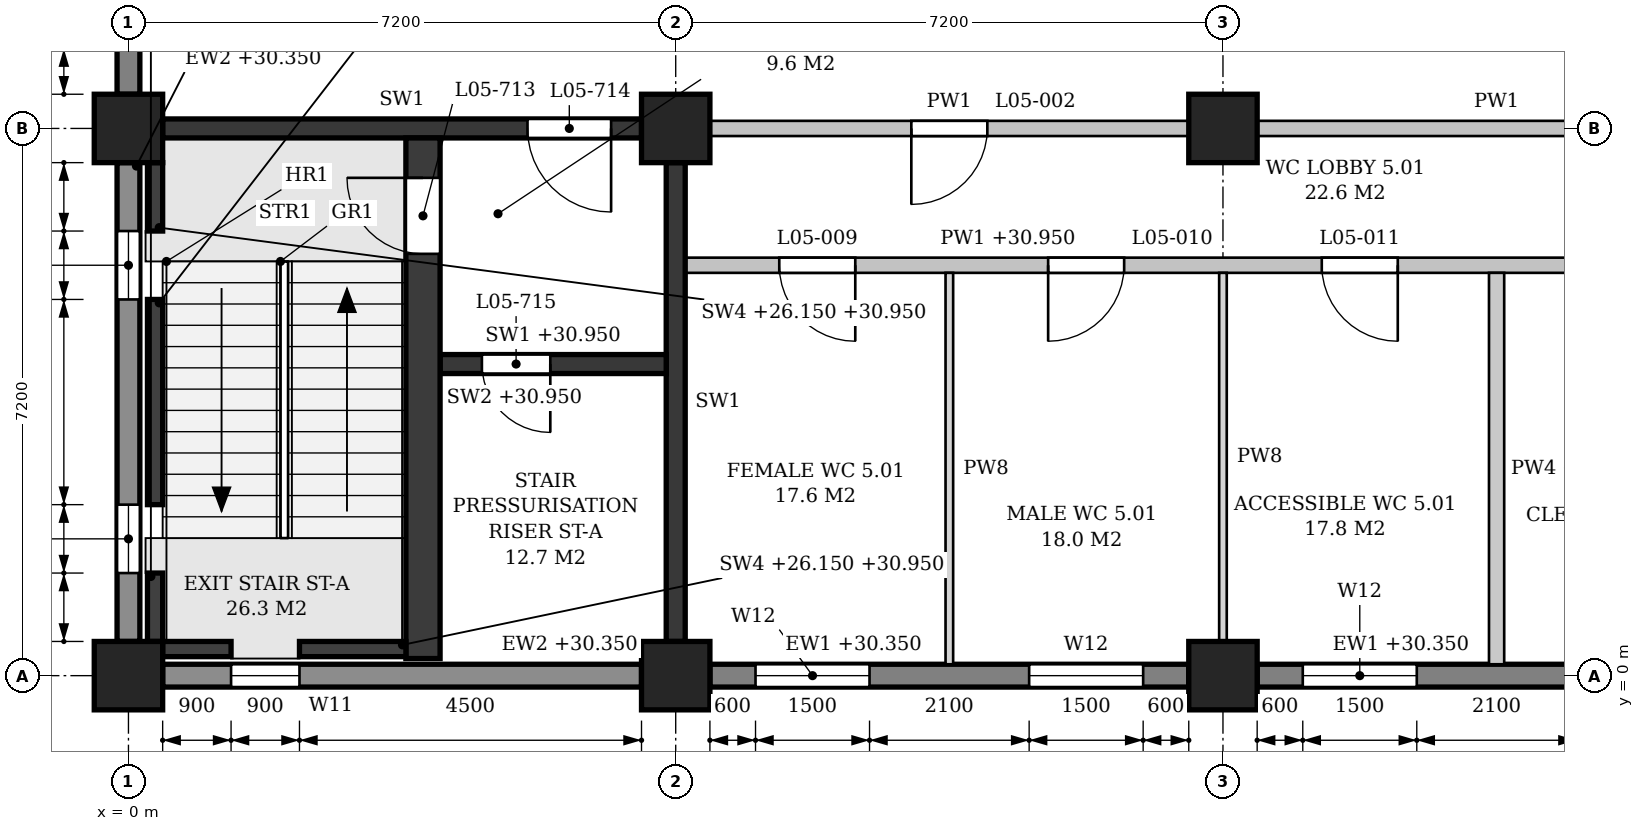
"""IFC4 building model, lengths in metres.
Left out: names, types, materials, properties, quantities, classifications, styles, units other than length and angle.
Written with IfcOpenShell. Run it as: python <this file> out.ifc"""

import sys

from ifc_helpers import new_model, si_unit, direction, frame, frame_2d, origin, origin_2d, place, context, subcontext, project, spatial, polyline, rectangle, outline, extrude, element, fill, save


model = new_model("IFC4")
c1 = context("Model", 3, precision=1e-05, world=origin(), true_north=direction((0.0, 1.0)))
c2 = subcontext(c1, "Body", "Model", "MODEL_VIEW")
j1 = project(units=[si_unit("LENGTHUNIT", "METRE"), si_unit("PLANEANGLEUNIT", "RADIAN")], contexts=[c1])
p1 = place(None, origin())
s1 = spatial("IfcSite", under=j1, at=p1, CompositionType="ELEMENT")
p2 = place(p1, origin())
s2 = spatial("IfcBuilding", under=s1, at=p2, CompositionType="ELEMENT")
p3 = place(p2, frame((0.0, 0.0, 26.4)))
s3 = spatial("IfcBuildingStorey", under=s2, at=p3, CompositionType="ELEMENT", Elevation=26.4)
for number, where, z_axis, x_axis in (
    (1, (0.0, 0.0, 0.0), (0.0, 0.0, 1.0), (1.0, 0.0, 0.0)),
    (2, (0.0, 7.2, 0.0), (0.0, 0.0, 1.0), (1.0, 0.0, 0.0)),
    (3, (7.2, 0.0, 0.0), (0.0, 0.0, 1.0), (1.0, 0.0, 0.0)),
    (4, (7.2, 7.2, 0.0), (0.0, 0.0, 1.0), (1.0, 0.0, 0.0)),
    (5, (14.4, 0.0, 0.0), (0.0, 0.0, 1.0), (1.0, 0.0, 0.0)),
    (6, (14.4, 7.2, 0.0), (0.0, 0.0, 1.0), (1.0, 0.0, 0.0)),
):
    element("IfcColumn", number, at=place(p3, frame(where, z_axis=z_axis, x_axis=x_axis)), inside=s3, PredefinedType="COLUMN", context=c2, shape_type="SweptSolid", body=[
        extrude(rectangle(XDim=0.9, YDim=0.9, at=origin_2d()), origin(), (0.0, 0.0, 1.0), 4.8),
    ])
p4 = place(p3, frame((0.0, 0.45, 0.0), z_axis=(0.0, 0.0, 1.0), x_axis=(0.0, 1.0, 0.0)))
e7 = element("IfcWall", 7, at=p4, inside=s3, PredefinedType="STANDARD", context=c2, shape_type="SweptSolid", body=[
    extrude(rectangle(XDim=6.3, YDim=0.3, at=frame_2d((3.15, 0.0))), origin(), (0.0, 0.0, 1.0), 3.95),
])
p5 = place(p4, frame((0.9, 0.0, 0.9)))
e8 = element("IfcOpeningElement", 8, at=p5, cuts=e7, PredefinedType="OPENING", context=c2, shape_type="SweptSolid", body=[
    extrude(outline(polyline([(0.0, 0.0), (0.9, 0.0), (0.9, 2.05), (0.45, 2.5), (0.0, 2.05), (0.0, 0.0)])), frame((0.0, 0.16, 0.0), z_axis=(0.0, -1.0, 0.0), x_axis=(1.0, 0.0, 0.0)), (0.0, 0.0, 1.0), 0.32),
])
p6 = place(p4, frame((4.5, 0.0, 0.9)))
e9 = element("IfcOpeningElement", 9, at=p6, cuts=e7, PredefinedType="OPENING", context=c2, shape_type="SweptSolid", body=[
    extrude(outline(polyline([(0.0, 0.0), (0.9, 0.0), (0.9, 2.05), (0.45, 2.5), (0.0, 2.05), (0.0, 0.0)])), frame((0.0, 0.16, 0.0), z_axis=(0.0, -1.0, 0.0), x_axis=(1.0, 0.0, 0.0)), (0.0, 0.0, 1.0), 0.32),
])
p7 = place(p3, frame((0.0, 7.65, 0.0), z_axis=(0.0, 0.0, 1.0), x_axis=(0.0, 1.0, 0.0)))
e10 = element("IfcWall", 10, at=p7, inside=s3, PredefinedType="STANDARD", context=c2, shape_type="SweptSolid", body=[
    extrude(rectangle(XDim=6.3, YDim=0.3, at=frame_2d((3.15, 0.0))), origin(), (0.0, 0.0, 1.0), 3.95),
])
p8 = place(p7, frame((0.6, 0.0, 0.9)))
e11 = element("IfcOpeningElement", 11, at=p8, cuts=e10, PredefinedType="OPENING", context=c2, shape_type="SweptSolid", body=[
    extrude(outline(polyline([(0.0, 0.0), (1.5, 0.0), (1.5, 1.75), (0.75, 2.5), (0.0, 1.75), (0.0, 0.0)])), frame((0.0, 0.16, 0.0), z_axis=(0.0, -1.0, 0.0), x_axis=(1.0, 0.0, 0.0)), (0.0, 0.0, 1.0), 0.32),
])
p9 = place(p7, frame((4.2, 0.0, 0.9)))
e12 = element("IfcOpeningElement", 12, at=p9, cuts=e10, PredefinedType="OPENING", context=c2, shape_type="SweptSolid", body=[
    extrude(outline(polyline([(0.0, 0.0), (1.5, 0.0), (1.5, 1.75), (0.75, 2.5), (0.0, 1.75), (0.0, 0.0)])), frame((0.0, 0.16, 0.0), z_axis=(0.0, -1.0, 0.0), x_axis=(1.0, 0.0, 0.0)), (0.0, 0.0, 1.0), 0.32),
])
p10 = place(p3, frame((0.45, 0.0, 0.0), z_axis=(0.0, 0.0, 1.0), x_axis=(1.0, 0.0, 0.0)))
e13 = element("IfcWall", 13, at=p10, inside=s3, PredefinedType="STANDARD", context=c2, shape_type="SweptSolid", body=[
    extrude(rectangle(XDim=6.3, YDim=0.3, at=frame_2d((3.15, 0.0))), origin(), (0.0, 0.0, 1.0), 3.95),
])
p11 = place(p10, frame((0.9, 0.0, 0.9)))
e14 = element("IfcOpeningElement", 14, at=p11, cuts=e13, PredefinedType="OPENING", context=c2, shape_type="SweptSolid", body=[
    extrude(outline(polyline([(0.0, 0.0), (0.9, 0.0), (0.9, 2.05), (0.45, 2.5), (0.0, 2.05), (0.0, 0.0)])), frame((0.0, 0.16, 0.0), z_axis=(0.0, -1.0, 0.0), x_axis=(1.0, 0.0, 0.0)), (0.0, 0.0, 1.0), 0.32),
])
p12 = place(p3, frame((7.65, 0.0, 0.0), z_axis=(0.0, 0.0, 1.0), x_axis=(1.0, 0.0, 0.0)))
e15 = element("IfcWall", 15, at=p12, inside=s3, PredefinedType="STANDARD", context=c2, shape_type="SweptSolid", body=[
    extrude(rectangle(XDim=6.3, YDim=0.3, at=frame_2d((3.15, 0.0))), origin(), (0.0, 0.0, 1.0), 3.95),
])
p13 = place(p12, frame((0.6, 0.0, 0.9)))
e16 = element("IfcOpeningElement", 16, at=p13, cuts=e15, PredefinedType="OPENING", context=c2, shape_type="SweptSolid", body=[
    extrude(outline(polyline([(0.0, 0.0), (1.5, 0.0), (1.5, 1.75), (0.75, 2.5), (0.0, 1.75), (0.0, 0.0)])), frame((0.0, 0.16, 0.0), z_axis=(0.0, -1.0, 0.0), x_axis=(1.0, 0.0, 0.0)), (0.0, 0.0, 1.0), 0.32),
])
p14 = place(p12, frame((4.2, 0.0, 0.9)))
e17 = element("IfcOpeningElement", 17, at=p14, cuts=e15, PredefinedType="OPENING", context=c2, shape_type="SweptSolid", body=[
    extrude(outline(polyline([(0.0, 0.0), (1.5, 0.0), (1.5, 1.75), (0.75, 2.5), (0.0, 1.75), (0.0, 0.0)])), frame((0.0, 0.16, 0.0), z_axis=(0.0, -1.0, 0.0), x_axis=(1.0, 0.0, 0.0)), (0.0, 0.0, 1.0), 0.32),
])
p15 = place(p3, frame((14.85, 0.0, 0.0), z_axis=(0.0, 0.0, 1.0), x_axis=(1.0, 0.0, 0.0)))
e18 = element("IfcWall", 18, at=p15, inside=s3, PredefinedType="STANDARD", context=c2, shape_type="SweptSolid", body=[
    extrude(rectangle(XDim=6.3, YDim=0.3, at=frame_2d((3.15, 0.0))), origin(), (0.0, 0.0, 1.0), 3.95),
])
p16 = place(p15, frame((0.6, 0.0, 0.9)))
e19 = element("IfcOpeningElement", 19, at=p16, cuts=e18, PredefinedType="OPENING", context=c2, shape_type="SweptSolid", body=[
    extrude(outline(polyline([(0.0, 0.0), (1.5, 0.0), (1.5, 1.75), (0.75, 2.5), (0.0, 1.75), (0.0, 0.0)])), frame((0.0, 0.16, 0.0), z_axis=(0.0, -1.0, 0.0), x_axis=(1.0, 0.0, 0.0)), (0.0, 0.0, 1.0), 0.32),
])
p17 = place(p15, frame((4.2, 0.0, 0.9)))
e20 = element("IfcOpeningElement", 20, at=p17, cuts=e18, PredefinedType="OPENING", context=c2, shape_type="SweptSolid", body=[
    extrude(outline(polyline([(0.0, 0.0), (1.5, 0.0), (1.5, 1.75), (0.75, 2.5), (0.0, 1.75), (0.0, 0.0)])), frame((0.0, 0.16, 0.0), z_axis=(0.0, -1.0, 0.0), x_axis=(1.0, 0.0, 0.0)), (0.0, 0.0, 1.0), 0.32),
])
p18 = place(p3, frame((0.45, 7.2, 0.0), z_axis=(0.0, 0.0, 1.0), x_axis=(1.0, 0.0, 0.0)))
e21 = element("IfcWall", 21, at=p18, inside=s3, PredefinedType="SHEAR", context=c2, shape_type="SweptSolid", body=[
    extrude(rectangle(XDim=6.3, YDim=0.25, at=frame_2d((3.15, 0.0))), origin(), (0.0, 0.0, 1.0), 3.8),
])
p19 = place(p18, frame((4.8, 0.0, 0.0)))
e22 = element("IfcOpeningElement", 22, at=p19, cuts=e21, PredefinedType="OPENING", context=c2, shape_type="SweptSolid", body=[
    extrude(rectangle(XDim=1.1, YDim=2.1, at=frame_2d((0.55, 1.05))), frame((0.0, 0.135, 0.0), z_axis=(0.0, -1.0, 0.0), x_axis=(1.0, 0.0, 0.0)), (0.0, 0.0, 1.0), 0.27),
])
p20 = place(p3, frame((7.2, 0.45, 0.0), z_axis=(0.0, 0.0, 1.0), x_axis=(0.0, 1.0, 0.0)))
e23 = element("IfcWall", 23, at=p20, inside=s3, PredefinedType="SHEAR", context=c2, shape_type="SweptSolid", body=[
    extrude(rectangle(XDim=6.3, YDim=0.25, at=frame_2d((3.15, 0.0))), origin(), (0.0, 0.0, 1.0), 3.8),
])
p21 = place(p3, frame((0.35, 0.45, -0.25), z_axis=(0.0, 0.0, 1.0), x_axis=(0.0, 1.0, 0.0)))
e24 = element("IfcWall", 24, at=p21, inside=s3, PredefinedType="SHEAR", context=c2, shape_type="SweptSolid", body=[
    extrude(rectangle(XDim=0.9, YDim=0.2, at=frame_2d((0.45, 0.0))), origin(), (0.0, 0.0, 1.0), 4.8),
])
p22 = place(p3, frame((0.35, 2.25, -0.25), z_axis=(0.0, 0.0, 1.0), x_axis=(0.0, 1.0, 0.0)))
e25 = element("IfcWall", 25, at=p22, inside=s3, PredefinedType="SHEAR", context=c2, shape_type="SweptSolid", body=[
    extrude(rectangle(XDim=2.7, YDim=0.2, at=frame_2d((1.35, 0.0))), origin(), (0.0, 0.0, 1.0), 4.8),
])
p23 = place(p3, frame((0.35, 5.85, -0.25), z_axis=(0.0, 0.0, 1.0), x_axis=(0.0, 1.0, 0.0)))
e26 = element("IfcWall", 26, at=p23, inside=s3, PredefinedType="SHEAR", context=c2, shape_type="SweptSolid", body=[
    extrude(rectangle(XDim=0.9, YDim=0.2, at=frame_2d((0.45, 0.0))), origin(), (0.0, 0.0, 1.0), 4.8),
])
p24 = place(p3, frame((0.45, 0.35, -0.25), z_axis=(0.0, 0.0, 1.0), x_axis=(1.0, 0.0, 0.0)))
e27 = element("IfcWall", 27, at=p24, inside=s3, PredefinedType="SHEAR", context=c2, shape_type="SweptSolid", body=[
    extrude(rectangle(XDim=0.9, YDim=0.2, at=frame_2d((0.45, 0.0))), origin(), (0.0, 0.0, 1.0), 4.8),
])
p25 = place(p3, frame((2.25, 0.35, -0.25), z_axis=(0.0, 0.0, 1.0), x_axis=(1.0, 0.0, 0.0)))
e28 = element("IfcWall", 28, at=p25, inside=s3, PredefinedType="SHEAR", context=c2, shape_type="SweptSolid", body=[
    extrude(rectangle(XDim=1.4, YDim=0.2, at=frame_2d((0.7, 0.0))), origin(), (0.0, 0.0, 1.0), 4.8),
])
p26 = place(p3, frame((3.875, 0.225, 0.0), z_axis=(0.0, 0.0, 1.0), x_axis=(0.0, 1.0, 0.0)))
e29 = element("IfcWall", 29, at=p26, inside=s3, PredefinedType="SHEAR", context=c2, shape_type="SweptSolid", body=[
    extrude(rectangle(XDim=6.85, YDim=0.45, at=frame_2d((3.425, 0.0))), origin(), (0.0, 0.0, 1.0), 4.55),
])
p27 = place(p26, frame((5.325, 0.0, 0.0)))
e30 = element("IfcOpeningElement", 30, at=p27, cuts=e29, PredefinedType="OPENING", context=c2, shape_type="SweptSolid", body=[
    extrude(rectangle(XDim=1.0, YDim=2.1, at=frame_2d((0.5, 1.05))), frame((0.0, 0.235, 0.0), z_axis=(0.0, -1.0, 0.0), x_axis=(1.0, 0.0, 0.0)), (0.0, 0.0, 1.0), 0.47),
])
p28 = place(p3, frame((4.1, 4.1, 0.0), z_axis=(0.0, 0.0, 1.0), x_axis=(1.0, 0.0, 0.0)))
e31 = element("IfcWall", 31, at=p28, inside=s3, PredefinedType="SHEAR", context=c2, shape_type="SweptSolid", body=[
    extrude(rectangle(XDim=2.975, YDim=0.25, at=frame_2d((1.487, 0.0))), origin(), (0.0, 0.0, 1.0), 4.55),
])
p29 = place(p28, frame((0.55, 0.0, 0.0)))
e32 = element("IfcOpeningElement", 32, at=p29, cuts=e31, PredefinedType="OPENING", context=c2, shape_type="SweptSolid", body=[
    extrude(rectangle(XDim=0.9, YDim=2.1, at=frame_2d((0.45, 1.05))), frame((0.0, 0.135, 0.0), z_axis=(0.0, -1.0, 0.0), x_axis=(1.0, 0.0, 0.0)), (0.0, 0.0, 1.0), 0.27),
])
p30 = place(p3, frame((7.325, 5.4, 0.0), z_axis=(0.0, 0.0, 1.0), x_axis=(1.0, 0.0, 0.0)))
e33 = element("IfcWall", 33, at=p30, inside=s3, PredefinedType="PARTITIONING", context=c2, shape_type="SweptSolid", body=[
    extrude(outline(polyline([(0.0, 0.0), (14.15, 0.0), (14.15, 3.8), (14.025, 3.8), (14.025, 4.55), (7.325, 4.55), (7.325, 3.8), (6.825, 3.8), (6.825, 4.55), (0.125, 4.55), (0.125, 3.8), (0.0, 3.8), (0.0, 0.0)])), frame((0.0, 0.1, 0.0), z_axis=(0.0, -1.0, 0.0), x_axis=(1.0, 0.0, 0.0)), (0.0, 0.0, 1.0), 0.2),
])
p31 = place(p30, frame((1.238, 0.0, 0.0)))
e34 = element("IfcOpeningElement", 34, at=p31, cuts=e33, PredefinedType="OPENING", context=c2, shape_type="SweptSolid", body=[
    extrude(rectangle(XDim=1.0, YDim=2.1, at=frame_2d((0.5, 1.05))), frame((0.0, 0.11, 0.0), z_axis=(0.0, -1.0, 0.0), x_axis=(1.0, 0.0, 0.0)), (0.0, 0.0, 1.0), 0.22),
])
p32 = place(p30, frame((4.775, 0.0, 0.0)))
e35 = element("IfcOpeningElement", 35, at=p32, cuts=e33, PredefinedType="OPENING", context=c2, shape_type="SweptSolid", body=[
    extrude(rectangle(XDim=1.0, YDim=2.1, at=frame_2d((0.5, 1.05))), frame((0.0, 0.11, 0.0), z_axis=(0.0, -1.0, 0.0), x_axis=(1.0, 0.0, 0.0)), (0.0, 0.0, 1.0), 0.22),
])
p33 = place(p30, frame((8.375, 0.0, 0.0)))
e36 = element("IfcOpeningElement", 36, at=p33, cuts=e33, PredefinedType="OPENING", context=c2, shape_type="SweptSolid", body=[
    extrude(rectangle(XDim=1.0, YDim=2.1, at=frame_2d((0.5, 1.05))), frame((0.0, 0.11, 0.0), z_axis=(0.0, -1.0, 0.0), x_axis=(1.0, 0.0, 0.0)), (0.0, 0.0, 1.0), 0.22),
])
p34 = place(p30, frame((11.913, 0.0, 0.0)))
e37 = element("IfcOpeningElement", 37, at=p34, cuts=e33, PredefinedType="OPENING", context=c2, shape_type="SweptSolid", body=[
    extrude(rectangle(XDim=1.0, YDim=2.1, at=frame_2d((0.5, 1.05))), frame((0.0, 0.11, 0.0), z_axis=(0.0, -1.0, 0.0), x_axis=(1.0, 0.0, 0.0)), (0.0, 0.0, 1.0), 0.22),
])
p35 = place(p3, frame((7.65, 7.2, 0.0), z_axis=(0.0, 0.0, 1.0), x_axis=(1.0, 0.0, 0.0)))
e38 = element("IfcWall", 38, at=p35, inside=s3, PredefinedType="PARTITIONING", context=c2, shape_type="SweptSolid", body=[
    extrude(rectangle(XDim=6.3, YDim=0.2, at=frame_2d((3.15, 0.0))), origin(), (0.0, 0.0, 1.0), 3.8),
])
p36 = place(p35, frame((2.65, 0.0, 0.0)))
e39 = element("IfcOpeningElement", 39, at=p36, cuts=e38, PredefinedType="OPENING", context=c2, shape_type="SweptSolid", body=[
    extrude(rectangle(XDim=1.0, YDim=2.1, at=frame_2d((0.5, 1.05))), frame((0.0, 0.11, 0.0), z_axis=(0.0, -1.0, 0.0), x_axis=(1.0, 0.0, 0.0)), (0.0, 0.0, 1.0), 0.22),
])
p37 = place(p3, frame((14.85, 7.2, 0.0), z_axis=(0.0, 0.0, 1.0), x_axis=(1.0, 0.0, 0.0)))
e40 = element("IfcWall", 40, at=p37, inside=s3, PredefinedType="PARTITIONING", context=c2, shape_type="SweptSolid", body=[
    extrude(rectangle(XDim=6.3, YDim=0.2, at=frame_2d((3.15, 0.0))), origin(), (0.0, 0.0, 1.0), 3.8),
])
p38 = place(p37, frame((4.225, 0.0, 0.0)))
e41 = element("IfcOpeningElement", 41, at=p38, cuts=e40, PredefinedType="OPENING", context=c2, shape_type="SweptSolid", body=[
    extrude(rectangle(XDim=1.0, YDim=2.1, at=frame_2d((0.5, 1.05))), frame((0.0, 0.11, 0.0), z_axis=(0.0, -1.0, 0.0), x_axis=(1.0, 0.0, 0.0)), (0.0, 0.0, 1.0), 0.22),
])
p39 = place(p3, frame((10.8, 0.15, 0.0), z_axis=(0.0, 0.0, 1.0), x_axis=(0.0, 1.0, 0.0)))
e42 = element("IfcWall", 42, at=p39, inside=s3, PredefinedType="PARTITIONING", context=c2, shape_type="SweptSolid", body=[
    extrude(rectangle(XDim=5.15, YDim=0.1, at=frame_2d((2.575, 0.0))), origin(), (0.0, 0.0, 1.0), 3.8),
])
p40 = place(p3, frame((14.4, 0.45, 0.0), z_axis=(0.0, 0.0, 1.0), x_axis=(0.0, 1.0, 0.0)))
e43 = element("IfcWall", 43, at=p40, inside=s3, PredefinedType="PARTITIONING", context=c2, shape_type="SweptSolid", body=[
    extrude(rectangle(XDim=4.85, YDim=0.1, at=frame_2d((2.425, 0.0))), origin(), (0.0, 0.0, 1.0), 3.8),
])
p41 = place(p3, frame((18.0, 0.15, 0.0), z_axis=(0.0, 0.0, 1.0), x_axis=(0.0, 1.0, 0.0)))
e44 = element("IfcWall", 44, at=p41, inside=s3, PredefinedType="PARTITIONING", context=c2, shape_type="SweptSolid", body=[
    extrude(outline(polyline([(0.0, 0.0), (5.15, 0.0), (5.15, 4.55), (0.1, 4.55), (0.1, 3.95), (0.0, 3.95), (0.0, 0.0)])), frame((0.0, 0.1, 0.0), z_axis=(0.0, -1.0, 0.0), x_axis=(1.0, 0.0, 0.0)), (0.0, 0.0, 1.0), 0.2),
])
p42 = place(p11, origin())
e45 = element("IfcWindow", 45, at=p42, inside=s3, PartitioningType="SINGLE_PANEL", PredefinedType="WINDOW", context=c2, shape_type="SweptSolid", body=[
    extrude(outline(polyline([(0.0, 0.0), (0.9, 0.0), (0.9, 2.05), (0.45, 2.5), (0.0, 2.05), (0.0, 0.0)])), frame((0.0, 0.03, 0.0), z_axis=(0.0, -1.0, 0.0), x_axis=(1.0, 0.0, 0.0)), (0.0, 0.0, 1.0), 0.06),
])
fill(e14, e45)
p43 = place(p13, origin())
e46 = element("IfcWindow", 46, at=p43, inside=s3, PartitioningType="SINGLE_PANEL", PredefinedType="WINDOW", context=c2, shape_type="SweptSolid", body=[
    extrude(outline(polyline([(0.0, 0.0), (1.5, 0.0), (1.5, 1.75), (0.75, 2.5), (0.0, 1.75), (0.0, 0.0)])), frame((0.0, 0.03, 0.0), z_axis=(0.0, -1.0, 0.0), x_axis=(1.0, 0.0, 0.0)), (0.0, 0.0, 1.0), 0.06),
])
fill(e16, e46)
p44 = place(p14, origin())
e47 = element("IfcWindow", 47, at=p44, inside=s3, PartitioningType="SINGLE_PANEL", PredefinedType="WINDOW", context=c2, shape_type="SweptSolid", body=[
    extrude(outline(polyline([(0.0, 0.0), (1.5, 0.0), (1.5, 1.75), (0.75, 2.5), (0.0, 1.75), (0.0, 0.0)])), frame((0.0, 0.03, 0.0), z_axis=(0.0, -1.0, 0.0), x_axis=(1.0, 0.0, 0.0)), (0.0, 0.0, 1.0), 0.06),
])
fill(e17, e47)
p45 = place(p16, origin())
e48 = element("IfcWindow", 48, at=p45, inside=s3, PartitioningType="SINGLE_PANEL", PredefinedType="WINDOW", context=c2, shape_type="SweptSolid", body=[
    extrude(outline(polyline([(0.0, 0.0), (1.5, 0.0), (1.5, 1.75), (0.75, 2.5), (0.0, 1.75), (0.0, 0.0)])), frame((0.0, 0.03, 0.0), z_axis=(0.0, -1.0, 0.0), x_axis=(1.0, 0.0, 0.0)), (0.0, 0.0, 1.0), 0.06),
])
fill(e19, e48)
p46 = place(p5, origin())
e49 = element("IfcWindow", 49, at=p46, inside=s3, PartitioningType="SINGLE_PANEL", PredefinedType="WINDOW", context=c2, shape_type="SweptSolid", body=[
    extrude(outline(polyline([(0.0, 0.0), (0.9, 0.0), (0.9, 2.05), (0.45, 2.5), (0.0, 2.05), (0.0, 0.0)])), frame((0.0, 0.03, 0.0), z_axis=(0.0, -1.0, 0.0), x_axis=(1.0, 0.0, 0.0)), (0.0, 0.0, 1.0), 0.06),
])
fill(e8, e49)
p47 = place(p6, origin())
e50 = element("IfcWindow", 50, at=p47, inside=s3, PartitioningType="SINGLE_PANEL", PredefinedType="WINDOW", context=c2, shape_type="SweptSolid", body=[
    extrude(outline(polyline([(0.0, 0.0), (0.9, 0.0), (0.9, 2.05), (0.45, 2.5), (0.0, 2.05), (0.0, 0.0)])), frame((0.0, 0.03, 0.0), z_axis=(0.0, -1.0, 0.0), x_axis=(1.0, 0.0, 0.0)), (0.0, 0.0, 1.0), 0.06),
])
fill(e9, e50)
p48 = place(p27, origin())
e51 = element("IfcDoor", 51, at=p48, inside=s3, OperationType="SINGLE_SWING_RIGHT", PredefinedType="DOOR", context=c2, shape_type="SweptSolid", body=[
    extrude(rectangle(XDim=1.0, YDim=2.1, at=frame_2d((0.5, 1.05))), frame((0.0, 0.025, 0.0), z_axis=(0.0, -1.0, 0.0), x_axis=(1.0, 0.0, 0.0)), (0.0, 0.0, 1.0), 0.05),
])
fill(e30, e51)
p49 = place(p19, frame((1.1, 0.0, 0.0), z_axis=(0.0, 0.0, 1.0), x_axis=(-1.0, 0.0, 0.0)))
e52 = element("IfcDoor", 52, at=p49, inside=s3, OperationType="SINGLE_SWING_LEFT", PredefinedType="DOOR", context=c2, shape_type="SweptSolid", body=[
    extrude(rectangle(XDim=1.1, YDim=2.1, at=frame_2d((0.55, 1.05))), frame((0.0, 0.025, 0.0), z_axis=(0.0, -1.0, 0.0), x_axis=(1.0, 0.0, 0.0)), (0.0, 0.0, 1.0), 0.05),
])
fill(e22, e52)
p50 = place(p29, frame((0.9, 0.0, 0.0), z_axis=(0.0, 0.0, 1.0), x_axis=(-1.0, 0.0, 0.0)))
e53 = element("IfcDoor", 53, at=p50, inside=s3, OperationType="SINGLE_SWING_LEFT", PredefinedType="DOOR", context=c2, shape_type="SweptSolid", body=[
    extrude(rectangle(XDim=0.9, YDim=2.1, at=frame_2d((0.45, 1.05))), frame((0.0, 0.025, 0.0), z_axis=(0.0, -1.0, 0.0), x_axis=(1.0, 0.0, 0.0)), (0.0, 0.0, 1.0), 0.05),
])
fill(e32, e53)
p51 = place(p36, frame((1.0, 0.0, 0.0), z_axis=(0.0, 0.0, 1.0), x_axis=(-1.0, 0.0, 0.0)))
e54 = element("IfcDoor", 54, at=p51, inside=s3, OperationType="SINGLE_SWING_RIGHT", PredefinedType="DOOR", context=c2, shape_type="SweptSolid", body=[
    extrude(rectangle(XDim=1.0, YDim=2.1, at=frame_2d((0.5, 1.05))), frame((0.0, 0.025, 0.0), z_axis=(0.0, -1.0, 0.0), x_axis=(1.0, 0.0, 0.0)), (0.0, 0.0, 1.0), 0.05),
])
fill(e39, e54)
p52 = place(p31, frame((1.0, 0.0, 0.0), z_axis=(0.0, 0.0, 1.0), x_axis=(-1.0, 0.0, 0.0)))
e55 = element("IfcDoor", 55, at=p52, inside=s3, OperationType="SINGLE_SWING_LEFT", PredefinedType="DOOR", context=c2, shape_type="SweptSolid", body=[
    extrude(rectangle(XDim=1.0, YDim=2.1, at=frame_2d((0.5, 1.05))), frame((0.0, 0.025, 0.0), z_axis=(0.0, -1.0, 0.0), x_axis=(1.0, 0.0, 0.0)), (0.0, 0.0, 1.0), 0.05),
])
fill(e34, e55)
p53 = place(p32, frame((1.0, 0.0, 0.0), z_axis=(0.0, 0.0, 1.0), x_axis=(-1.0, 0.0, 0.0)))
e56 = element("IfcDoor", 56, at=p53, inside=s3, OperationType="SINGLE_SWING_RIGHT", PredefinedType="DOOR", context=c2, shape_type="SweptSolid", body=[
    extrude(rectangle(XDim=1.0, YDim=2.1, at=frame_2d((0.5, 1.05))), frame((0.0, 0.025, 0.0), z_axis=(0.0, -1.0, 0.0), x_axis=(1.0, 0.0, 0.0)), (0.0, 0.0, 1.0), 0.05),
])
fill(e35, e56)
p54 = place(p33, frame((1.0, 0.0, 0.0), z_axis=(0.0, 0.0, 1.0), x_axis=(-1.0, 0.0, 0.0)))
e57 = element("IfcDoor", 57, at=p54, inside=s3, OperationType="SINGLE_SWING_LEFT", PredefinedType="DOOR", context=c2, shape_type="SweptSolid", body=[
    extrude(rectangle(XDim=1.0, YDim=2.1, at=frame_2d((0.5, 1.05))), frame((0.0, 0.025, 0.0), z_axis=(0.0, -1.0, 0.0), x_axis=(1.0, 0.0, 0.0)), (0.0, 0.0, 1.0), 0.05),
])
fill(e36, e57)
save(model, sys.argv[1])
